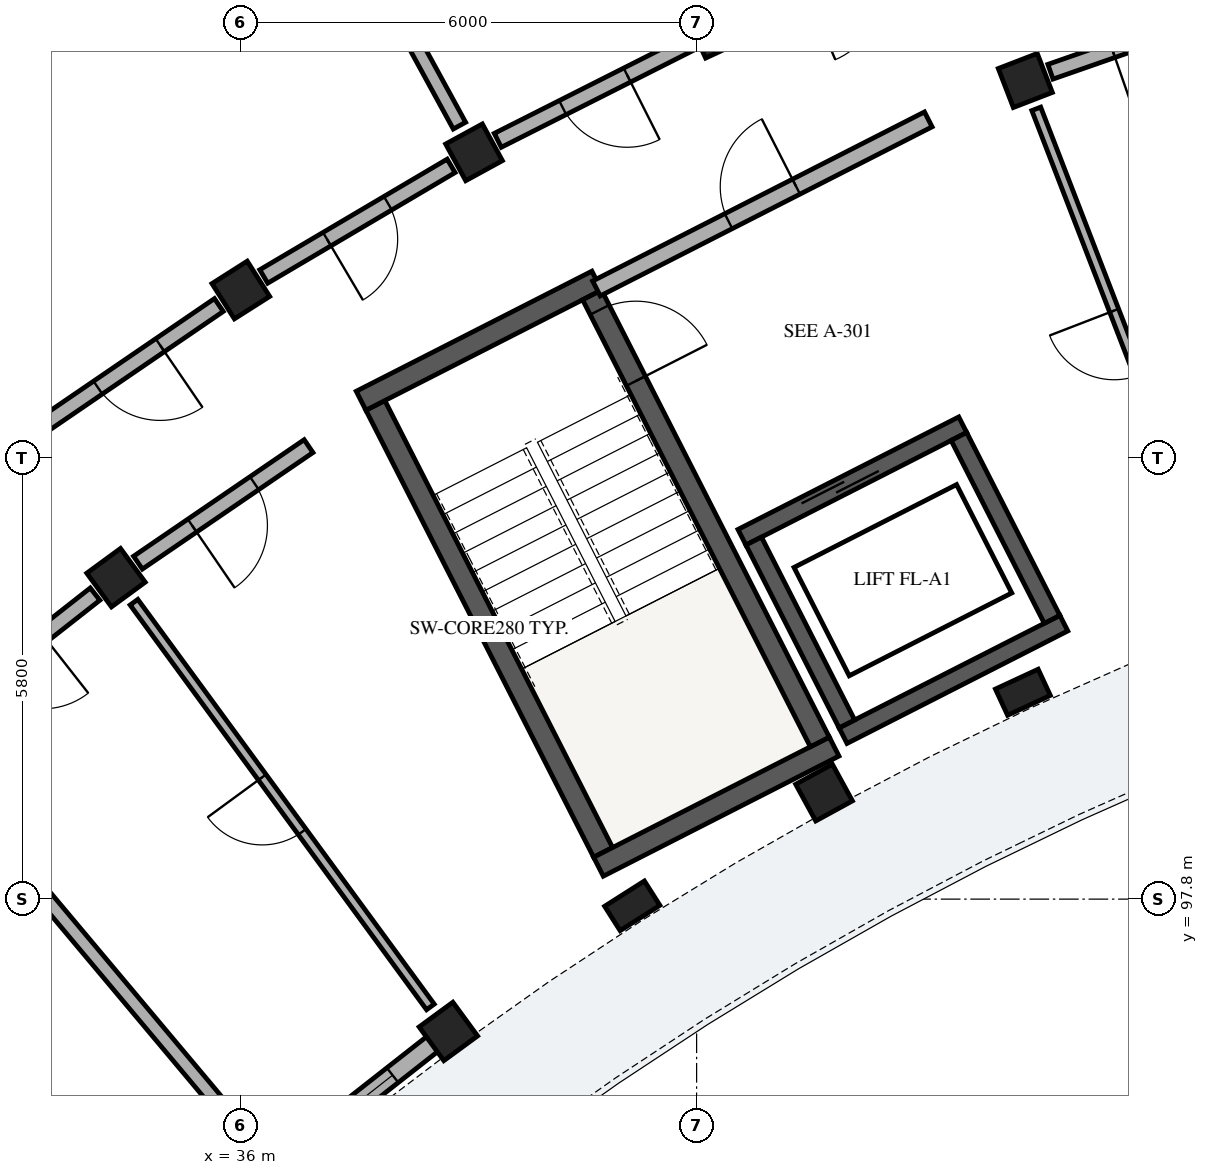
"""IFC4 building model, lengths in metres.
Left out: names, types, materials, properties, quantities, classifications, styles, units other than length and angle.
Written with IfcOpenShell. Run it as: python <this file> out.ifc"""

import sys

from ifc_helpers import new_model, si_unit, direction, frame, frame_2d, origin, origin_2d, place, context, subcontext, project, spatial, rectangle, extrude, element, fill, save


model = new_model("IFC4")
c1 = context("Model", 3, precision=1e-05, world=origin(), true_north=direction((0.0, 1.0)))
c2 = subcontext(c1, "Body", "Model", "MODEL_VIEW")
j1 = project(units=[si_unit("LENGTHUNIT", "METRE"), si_unit("PLANEANGLEUNIT", "RADIAN")], contexts=[c1])
p1 = place(None, origin())
s1 = spatial("IfcSite", under=j1, at=p1, CompositionType="ELEMENT")
p2 = place(p1, origin())
s2 = spatial("IfcBuilding", under=s1, at=p2, CompositionType="ELEMENT")
p3 = place(p2, frame((0.0, 0.0, 18.92)))
s3 = spatial("IfcBuildingStorey", under=s2, at=p3, CompositionType="ELEMENT", Elevation=18.92)
p4 = place(p3, frame((37.773, 104.296, 0.0), z_axis=(0.0, 0.0, 1.0), x_axis=(0.453992276384, -0.891005618941, 0.0)))
e1 = element("IfcWall", 1, at=p4, inside=s3, PredefinedType="SHEAR", context=c2, shape_type="SweptSolid", body=[
    extrude(rectangle(XDim=6.6, YDim=0.28, at=frame_2d((3.3, 0.0))), origin(), (0.0, 0.0, 1.0), 3.11),
])
for number, where, z_axis, x_axis in (
    (2, (40.709, 98.227, 0.0), (0.0, 0.0, 1.0), (0.891, 0.454, 0.0)),
    (3, (37.585, 104.357, 0.0), (0.0, 0.0, 1.0), (0.891, 0.454, 0.0)),
):
    element("IfcWall", number, at=place(p3, frame(where, z_axis=z_axis, x_axis=x_axis)), inside=s3, PredefinedType="SHEAR", context=c2, shape_type="SweptSolid", body=[
        extrude(rectangle(XDim=3.48, YDim=0.28, at=frame_2d((1.74, 0.0))), origin(), (0.0, 0.0, 1.0), 3.11),
    ])
p5 = place(p3, frame((40.625, 105.748, 0.0), z_axis=(0.0, 0.0, 1.0), x_axis=(0.453992276384, -0.891005618941, 0.0)))
e4 = element("IfcWall", 4, at=p5, inside=s3, PredefinedType="SHEAR", context=c2, shape_type="SweptSolid", body=[
    extrude(rectangle(XDim=6.6, YDim=0.28, at=frame_2d((3.3, 0.0))), origin(), (0.0, 0.0, 1.0), 3.11),
])
p6 = place(p5, frame((0.22, 0.0, 0.0)))
e5 = element("IfcOpeningElement", 5, at=p6, cuts=e4, PredefinedType="OPENING", context=c2, shape_type="SweptSolid", body=[
    extrude(rectangle(XDim=1.05, YDim=2.15, at=frame_2d((0.525, 1.075))), frame((0.0, 0.15, 0.0), z_axis=(0.0, -1.0, 0.0), x_axis=(1.0, 0.0, 0.0)), (0.0, 0.0, 1.0), 0.3),
])
p7 = place(p3, frame((42.597, 102.561, 0.0), z_axis=(0.0, 0.0, 1.0), x_axis=(0.891001200497, 0.454000947921, 0.0)))
e6 = element("IfcWall", 6, at=p7, inside=s3, PredefinedType="SHEAR", context=c2, shape_type="SweptSolid", body=[
    extrude(rectangle(XDim=3.26, YDim=0.23, at=frame_2d((1.63, 0.0))), origin(), (0.0, 0.0, 1.0), 3.11),
])
p8 = place(p7, frame((0.9, 0.0, 0.0)))
e7 = element("IfcOpeningElement", 7, at=p8, cuts=e6, PredefinedType="OPENING", context=c2, shape_type="SweptSolid", body=[
    extrude(rectangle(XDim=1.1, YDim=2.15, at=frame_2d((0.55, 1.075))), frame((0.0, 0.125, 0.0), z_axis=(0.0, -1.0, 0.0), x_axis=(1.0, 0.0, 0.0)), (0.0, 0.0, 1.0), 0.25),
])
p9 = place(p3, frame((43.927, 99.95, 0.0), z_axis=(0.0, 0.0, 1.0), x_axis=(0.891016635648, 0.453970654337, 0.0)))
e8 = element("IfcWall", 8, at=p9, inside=s3, PredefinedType="SHEAR", context=c2, shape_type="SweptSolid", body=[
    extrude(rectangle(XDim=3.26, YDim=0.23, at=frame_2d((1.63, 0.0))), origin(), (0.0, 0.0, 1.0), 3.11),
])
for number, where, z_axis, x_axis in (
    (9, (42.751, 102.511, 0.0), (0.0, 0.0, 1.0), (0.454, -0.891, 0.0)),
    (10, (45.451, 103.886, 0.0), (0.0, 0.0, 1.0), (0.454, -0.891, 0.0)),
):
    element("IfcWall", number, at=place(p3, frame(where, z_axis=z_axis, x_axis=x_axis)), inside=s3, PredefinedType="SHEAR", context=c2, shape_type="SweptSolid", body=[
        extrude(rectangle(XDim=2.7, YDim=0.23, at=frame_2d((1.35, 0.0))), origin(), (0.0, 0.0, 1.0), 3.11),
    ])
p10 = place(p3, frame((46.325, 108.57, 0.0), z_axis=(0.0, 0.0, 1.0), x_axis=(-0.360177739278, 0.932883699144, 0.0)))
e11 = element("IfcColumn", 11, at=p10, inside=s3, PredefinedType="COLUMN", context=c2, shape_type="SweptSolid", body=[
    extrude(rectangle(XDim=0.55, YDim=0.55, at=origin_2d()), origin(), (0.0, 0.0, 1.0), 3.11),
])
p11 = place(p3, frame((46.293, 100.522, 0.0), z_axis=(0.0, 0.0, 1.0), x_axis=(-0.420859924104, 0.907125638643, 0.0)))
e12 = element("IfcColumn", 12, at=p11, inside=s3, PredefinedType="PILASTER", context=c2, shape_type="SweptSolid", body=[
    extrude(rectangle(XDim=0.38, YDim=0.62, at=origin_2d()), origin(), (0.0, 0.0, 1.0), 3.11),
])
for number, where, z_axis, x_axis in (
    (13, (42.252, 109.23, 0.0), (0.0, 0.0, 1.0), (-0.421, 0.907, 0.0)),
    (14, (43.677, 99.202, 0.0), (0.0, 0.0, 1.0), (-0.48, 0.877, 0.0)),
    (15, (39.072, 107.625, 0.0), (0.0, 0.0, 1.0), (-0.48, 0.877, 0.0)),
):
    element("IfcColumn", number, at=place(p3, frame(where, z_axis=z_axis, x_axis=x_axis)), inside=s3, PredefinedType="COLUMN", context=c2, shape_type="SweptSolid", body=[
        extrude(rectangle(XDim=0.55, YDim=0.55, at=origin_2d()), origin(), (0.0, 0.0, 1.0), 3.11),
    ])
p12 = place(p3, frame((41.153, 97.712, 0.0), z_axis=(0.0, 0.0, 1.0), x_axis=(-0.536481603385, 0.843912015099, 0.0)))
e16 = element("IfcColumn", 16, at=p12, inside=s3, PredefinedType="PILASTER", context=c2, shape_type="SweptSolid", body=[
    extrude(rectangle(XDim=0.38, YDim=0.62, at=origin_2d()), origin(), (0.0, 0.0, 1.0), 3.11),
])
for number, where, z_axis, x_axis in (
    (17, (36.003, 105.813, 0.0), (0.0, 0.0, 1.0), (-0.536, 0.844, 0.0)),
    (18, (38.734, 96.059, 0.0), (0.0, 0.0, 1.0), (-0.591, 0.807, 0.0)),
    (19, (34.361, 102.029, 0.0), (0.0, 0.0, 1.0), (-0.591, 0.807, 0.0)),
):
    element("IfcColumn", number, at=place(p3, frame(where, z_axis=z_axis, x_axis=x_axis)), inside=s3, PredefinedType="COLUMN", context=c2, shape_type="SweptSolid", body=[
        extrude(rectangle(XDim=0.55, YDim=0.55, at=origin_2d()), origin(), (0.0, 0.0, 1.0), 3.11),
    ])
p13 = place(p3, frame((38.541, 95.908, 0.0), z_axis=(0.0, 0.0, 1.0), x_axis=(-0.786831325151, -0.617168101704, 0.0)))
e20 = element("IfcWall", 20, at=p13, inside=s3, PredefinedType="SOLIDWALL", context=c2, shape_type="SweptSolid", body=[
    extrude(rectangle(XDim=2.525, YDim=0.245, at=frame_2d((1.263, 0.0))), origin(), (0.0, 0.0, 1.0), 2.355),
])
p14 = place(p13, frame((0.688, 0.0, 0.55)))
e21 = element("IfcOpeningElement", 21, at=p14, cuts=e20, PredefinedType="OPENING", context=c2, shape_type="SweptSolid", body=[
    extrude(rectangle(XDim=1.15, YDim=1.5, at=frame_2d((0.575, 0.75))), frame((0.0, 0.133, 0.0), z_axis=(0.0, -1.0, 0.0), x_axis=(1.0, 0.0, 0.0)), (0.0, 0.0, 1.0), 0.265),
])
p15 = place(p3, frame((40.682, 105.834, 0.0), z_axis=(0.0, 0.0, 1.0), x_axis=(0.891003372311, 0.453996685595, 0.0)))
e22 = element("IfcWall", 22, at=p15, inside=s3, PredefinedType="PARTITIONING", context=c2, shape_type="SweptSolid", body=[
    extrude(rectangle(XDim=4.9, YDim=0.22, at=frame_2d((2.45, 0.0))), origin(), (0.0, 0.0, 1.0), 2.34),
])
p16 = place(p15, frame((1.95, 0.0, 0.0)))
e23 = element("IfcOpeningElement", 23, at=p16, cuts=e22, PredefinedType="OPENING", context=c2, shape_type="SweptSolid", body=[
    extrude(rectangle(XDim=1.0, YDim=2.15, at=frame_2d((0.5, 1.075))), frame((0.0, 0.12, 0.0), z_axis=(0.0, -1.0, 0.0), x_axis=(1.0, 0.0, 0.0)), (0.0, 0.0, 1.0), 0.24),
])
p17 = place(p3, frame((49.222, 109.58, 0.0), z_axis=(0.0, 0.0, 1.0), x_axis=(-0.944265123647, -0.329185929627, 0.0)))
e24 = element("IfcWall", 24, at=p17, inside=s3, PredefinedType="PARTITIONING", context=c2, shape_type="SweptSolid", body=[
    extrude(rectangle(XDim=2.718, YDim=0.205, at=frame_2d((1.359, 0.0))), origin(), (0.0, 0.0, 1.0), 2.37),
])
p18 = place(p17, frame((0.864, 0.0, 0.0)))
e25 = element("IfcOpeningElement", 25, at=p18, cuts=e24, PredefinedType="OPENING", context=c2, shape_type="SweptSolid", body=[
    extrude(rectangle(XDim=0.99, YDim=2.16, at=frame_2d((0.495, 1.08))), frame((0.0, 0.113, 0.0), z_axis=(0.0, -1.0, 0.0), x_axis=(1.0, 0.0, 0.0)), (0.0, 0.0, 1.0), 0.225),
])
p19 = place(p3, frame((48.846, 102.04, 0.0), z_axis=(0.0, 0.0, 1.0), x_axis=(-0.360183473608, 0.932881485152, 0.0)))
e26 = element("IfcWall", 26, at=p19, inside=s3, PredefinedType="PARTITIONING", context=c2, shape_type="SweptSolid", body=[
    extrude(rectangle(XDim=6.6, YDim=0.125, at=frame_2d((3.3, 0.0))), origin(), (0.0, 0.0, 1.0), 2.37),
])
p20 = place(p19, frame((2.845, 0.0, 0.0)))
e27 = element("IfcOpeningElement", 27, at=p20, cuts=e26, PredefinedType="OPENING", context=c2, shape_type="SweptSolid", body=[
    extrude(rectangle(XDim=0.91, YDim=2.1, at=frame_2d((0.455, 1.05))), frame((0.0, 0.073, 0.0), z_axis=(0.0, -1.0, 0.0), x_axis=(1.0, 0.0, 0.0)), (0.0, 0.0, 1.0), 0.145),
])
p21 = place(p3, frame((41.94, 109.073, 0.0), z_axis=(0.0, 0.0, 1.0), x_axis=(-0.89273239336, -0.450587254419, 0.0)))
e28 = element("IfcWall", 28, at=p21, inside=s3, PredefinedType="PARTITIONING", context=c2, shape_type="SweptSolid", body=[
    extrude(rectangle(XDim=2.863, YDim=0.205, at=frame_2d((1.432, 0.0))), origin(), (0.0, 0.0, 1.0), 2.37),
])
p22 = place(p21, frame((0.957, 0.0, 0.0)))
e29 = element("IfcOpeningElement", 29, at=p22, cuts=e28, PredefinedType="OPENING", context=c2, shape_type="SweptSolid", body=[
    extrude(rectangle(XDim=0.95, YDim=2.13, at=frame_2d((0.475, 1.065))), frame((0.0, 0.113, 0.0), z_axis=(0.0, -1.0, 0.0), x_axis=(1.0, 0.0, 0.0)), (0.0, 0.0, 1.0), 0.225),
])
p23 = place(p3, frame((38.88, 107.976, 0.0), z_axis=(0.0, 0.0, 1.0), x_axis=(-0.479721743761, 0.877420679357, 0.0)))
e30 = element("IfcWall", 30, at=p23, inside=s3, PredefinedType="PARTITIONING", context=c2, shape_type="SweptSolid", body=[
    extrude(rectangle(XDim=4.7, YDim=0.185, at=frame_2d((2.35, 0.0))), origin(), (0.0, 0.0, 1.0), 2.37),
])
p24 = place(p3, frame((38.77, 107.447, 0.0), z_axis=(0.0, 0.0, 1.0), x_axis=(-0.861113214678, -0.508413248753, 0.0)))
e31 = element("IfcWall", 31, at=p24, inside=s3, PredefinedType="PARTITIONING", context=c2, shape_type="SweptSolid", body=[
    extrude(rectangle(XDim=2.863, YDim=0.205, at=frame_2d((1.432, 0.0))), origin(), (0.0, 0.0, 1.0), 2.37),
])
p25 = place(p24, frame((0.967, 0.0, 0.0)))
e32 = element("IfcOpeningElement", 32, at=p25, cuts=e31, PredefinedType="OPENING", context=c2, shape_type="SweptSolid", body=[
    extrude(rectangle(XDim=0.93, YDim=2.12, at=frame_2d((0.465, 1.06))), frame((0.0, 0.113, 0.0), z_axis=(0.0, -1.0, 0.0), x_axis=(1.0, 0.0, 0.0)), (0.0, 0.0, 1.0), 0.225),
])
p26 = place(p3, frame((35.714, 105.616, 0.0), z_axis=(0.0, 0.0, 1.0), x_axis=(-0.825779671787, -0.563992848947, 0.0)))
e33 = element("IfcWall", 33, at=p26, inside=s3, PredefinedType="PARTITIONING", context=c2, shape_type="SweptSolid", body=[
    extrude(rectangle(XDim=2.863, YDim=0.205, at=frame_2d((1.432, 0.0))), origin(), (0.0, 0.0, 1.0), 2.37),
])
p27 = place(p26, frame((0.937, 0.0, 0.0)))
e34 = element("IfcOpeningElement", 34, at=p27, cuts=e33, PredefinedType="OPENING", context=c2, shape_type="SweptSolid", body=[
    extrude(rectangle(XDim=0.99, YDim=2.16, at=frame_2d((0.495, 1.08))), frame((0.0, 0.113, 0.0), z_axis=(0.0, -1.0, 0.0), x_axis=(1.0, 0.0, 0.0)), (0.0, 0.0, 1.0), 0.225),
])
p28 = place(p3, frame((36.895, 103.76, 0.0), z_axis=(0.0, 0.0, 1.0), x_axis=(-0.825752009056, -0.56403334967, 0.0)))
e35 = element("IfcWall", 35, at=p28, inside=s3, PredefinedType="PARTITIONING", context=c2, shape_type="SweptSolid", body=[
    extrude(rectangle(XDim=2.718, YDim=0.205, at=frame_2d((1.359, 0.0))), origin(), (0.0, 0.0, 1.0), 2.37),
])
p29 = place(p28, frame((0.864, 0.0, 0.0)))
e36 = element("IfcOpeningElement", 36, at=p29, cuts=e35, PredefinedType="OPENING", context=c2, shape_type="SweptSolid", body=[
    extrude(rectangle(XDim=0.99, YDim=2.16, at=frame_2d((0.495, 1.08))), frame((0.0, 0.113, 0.0), z_axis=(0.0, -1.0, 0.0), x_axis=(1.0, 0.0, 0.0)), (0.0, 0.0, 1.0), 0.225),
])
p30 = place(p3, frame((38.497, 96.382, 0.0), z_axis=(0.0, 0.0, 1.0), x_axis=(-0.590924179316, 0.806727100263, 0.0)))
e37 = element("IfcWall", 37, at=p30, inside=s3, PredefinedType="PARTITIONING", context=c2, shape_type="SweptSolid", body=[
    extrude(rectangle(XDim=6.6, YDim=0.125, at=frame_2d((3.3, 0.0))), origin(), (0.0, 0.0, 1.0), 2.37),
])
p31 = place(p30, frame((2.855, 0.0, 0.0)))
e38 = element("IfcOpeningElement", 38, at=p31, cuts=e37, PredefinedType="OPENING", context=c2, shape_type="SweptSolid", body=[
    extrude(rectangle(XDim=0.89, YDim=2.1, at=frame_2d((0.445, 1.05))), frame((0.0, 0.073, 0.0), z_axis=(0.0, -1.0, 0.0), x_axis=(1.0, 0.0, 0.0)), (0.0, 0.0, 1.0), 0.145),
])
p32 = place(p3, frame((34.085, 101.813, 0.0), z_axis=(0.0, 0.0, 1.0), x_axis=(-0.786835457019, -0.617162833924, 0.0)))
e39 = element("IfcWall", 39, at=p32, inside=s3, PredefinedType="PARTITIONING", context=c2, shape_type="SweptSolid", body=[
    extrude(rectangle(XDim=2.718, YDim=0.205, at=frame_2d((1.359, 0.0))), origin(), (0.0, 0.0, 1.0), 2.37),
])
p33 = place(p32, frame((0.874, 0.0, 0.0)))
e40 = element("IfcOpeningElement", 40, at=p33, cuts=e39, PredefinedType="OPENING", context=c2, shape_type="SweptSolid", body=[
    extrude(rectangle(XDim=0.97, YDim=2.15, at=frame_2d((0.485, 1.075))), frame((0.0, 0.113, 0.0), z_axis=(0.0, -1.0, 0.0), x_axis=(1.0, 0.0, 0.0)), (0.0, 0.0, 1.0), 0.225),
])
p34 = place(p3, frame((36.171, 94.557, 0.0), z_axis=(0.0, 0.0, 1.0), x_axis=(-0.642789470807, 0.766042881449, 0.0)))
e41 = element("IfcWall", 41, at=p34, inside=s3, PredefinedType="PARTITIONING", context=c2, shape_type="SweptSolid", body=[
    extrude(rectangle(XDim=6.6, YDim=0.185, at=frame_2d((3.3, 0.0))), origin(), (0.0, 0.0, 1.0), 2.37),
])
p35 = place(p14, origin())
e42 = element("IfcWindow", 42, at=p35, inside=s3, PartitioningType="SINGLE_PANEL", PredefinedType="WINDOW", context=c2, shape_type="SweptSolid", body=[
    extrude(rectangle(XDim=1.15, YDim=1.5, at=frame_2d((0.575, 0.75))), frame((0.0, 0.03, 0.0), z_axis=(0.0, -1.0, 0.0), x_axis=(1.0, 0.0, 0.0)), (0.0, 0.0, 1.0), 0.06),
])
fill(e21, e42)
p36 = place(p6, origin())
e43 = element("IfcDoor", 43, at=p36, inside=s3, OperationType="SINGLE_SWING_RIGHT", PredefinedType="DOOR", context=c2, shape_type="SweptSolid", body=[
    extrude(rectangle(XDim=1.05, YDim=2.15, at=frame_2d((0.525, 1.075))), frame((0.0, 0.025, 0.0), z_axis=(0.0, -1.0, 0.0), x_axis=(1.0, 0.0, 0.0)), (0.0, 0.0, 1.0), 0.05),
])
fill(e5, e43)
p37 = place(p8, origin())
e44 = element("IfcDoor", 44, at=p37, inside=s3, OperationType="DOUBLE_DOOR_SLIDING", PredefinedType="DOOR", context=c2, shape_type="SweptSolid", body=[
    extrude(rectangle(XDim=1.1, YDim=2.15, at=frame_2d((0.55, 1.075))), frame((0.0, 0.025, 0.0), z_axis=(0.0, -1.0, 0.0), x_axis=(1.0, 0.0, 0.0)), (0.0, 0.0, 1.0), 0.05),
])
fill(e7, e44)
p38 = place(p16, origin())
e45 = element("IfcDoor", 45, at=p38, inside=s3, OperationType="SINGLE_SWING_RIGHT", PredefinedType="DOOR", context=c2, shape_type="SweptSolid", body=[
    extrude(rectangle(XDim=1.0, YDim=2.15, at=frame_2d((0.5, 1.075))), frame((0.0, 0.025, 0.0), z_axis=(0.0, -1.0, 0.0), x_axis=(1.0, 0.0, 0.0)), (0.0, 0.0, 1.0), 0.05),
])
fill(e23, e45)
p39 = place(p18, origin())
e46 = element("IfcDoor", 46, at=p39, inside=s3, OperationType="SINGLE_SWING_RIGHT", PredefinedType="DOOR", context=c2, shape_type="SweptSolid", body=[
    extrude(rectangle(XDim=0.99, YDim=2.16, at=frame_2d((0.495, 1.08))), frame((0.0, 0.025, 0.0), z_axis=(0.0, -1.0, 0.0), x_axis=(1.0, 0.0, 0.0)), (0.0, 0.0, 1.0), 0.05),
])
fill(e25, e46)
p40 = place(p20, origin())
e47 = element("IfcDoor", 47, at=p40, inside=s3, OperationType="SINGLE_SWING_RIGHT", PredefinedType="DOOR", context=c2, shape_type="SweptSolid", body=[
    extrude(rectangle(XDim=0.91, YDim=2.1, at=frame_2d((0.455, 1.05))), frame((0.0, 0.025, 0.0), z_axis=(0.0, -1.0, 0.0), x_axis=(1.0, 0.0, 0.0)), (0.0, 0.0, 1.0), 0.05),
])
fill(e27, e47)
p41 = place(p22, origin())
e48 = element("IfcDoor", 48, at=p41, inside=s3, OperationType="SINGLE_SWING_LEFT", PredefinedType="DOOR", context=c2, shape_type="SweptSolid", body=[
    extrude(rectangle(XDim=0.95, YDim=2.13, at=frame_2d((0.475, 1.065))), frame((0.0, 0.025, 0.0), z_axis=(0.0, -1.0, 0.0), x_axis=(1.0, 0.0, 0.0)), (0.0, 0.0, 1.0), 0.05),
])
fill(e29, e48)
p42 = place(p25, origin())
e49 = element("IfcDoor", 49, at=p42, inside=s3, OperationType="SINGLE_SWING_RIGHT", PredefinedType="DOOR", context=c2, shape_type="SweptSolid", body=[
    extrude(rectangle(XDim=0.93, YDim=2.12, at=frame_2d((0.465, 1.06))), frame((0.0, 0.025, 0.0), z_axis=(0.0, -1.0, 0.0), x_axis=(1.0, 0.0, 0.0)), (0.0, 0.0, 1.0), 0.05),
])
fill(e32, e49)
p43 = place(p27, origin())
e50 = element("IfcDoor", 50, at=p43, inside=s3, OperationType="SINGLE_SWING_LEFT", PredefinedType="DOOR", context=c2, shape_type="SweptSolid", body=[
    extrude(rectangle(XDim=0.99, YDim=2.16, at=frame_2d((0.495, 1.08))), frame((0.0, 0.025, 0.0), z_axis=(0.0, -1.0, 0.0), x_axis=(1.0, 0.0, 0.0)), (0.0, 0.0, 1.0), 0.05),
])
fill(e34, e50)
p44 = place(p29, origin())
e51 = element("IfcDoor", 51, at=p44, inside=s3, OperationType="SINGLE_SWING_RIGHT", PredefinedType="DOOR", context=c2, shape_type="SweptSolid", body=[
    extrude(rectangle(XDim=0.99, YDim=2.16, at=frame_2d((0.495, 1.08))), frame((0.0, 0.025, 0.0), z_axis=(0.0, -1.0, 0.0), x_axis=(1.0, 0.0, 0.0)), (0.0, 0.0, 1.0), 0.05),
])
fill(e36, e51)
p45 = place(p31, origin())
e52 = element("IfcDoor", 52, at=p45, inside=s3, OperationType="SINGLE_SWING_RIGHT", PredefinedType="DOOR", context=c2, shape_type="SweptSolid", body=[
    extrude(rectangle(XDim=0.89, YDim=2.1, at=frame_2d((0.445, 1.05))), frame((0.0, 0.025, 0.0), z_axis=(0.0, -1.0, 0.0), x_axis=(1.0, 0.0, 0.0)), (0.0, 0.0, 1.0), 0.05),
])
fill(e38, e52)
save(model, sys.argv[1])
